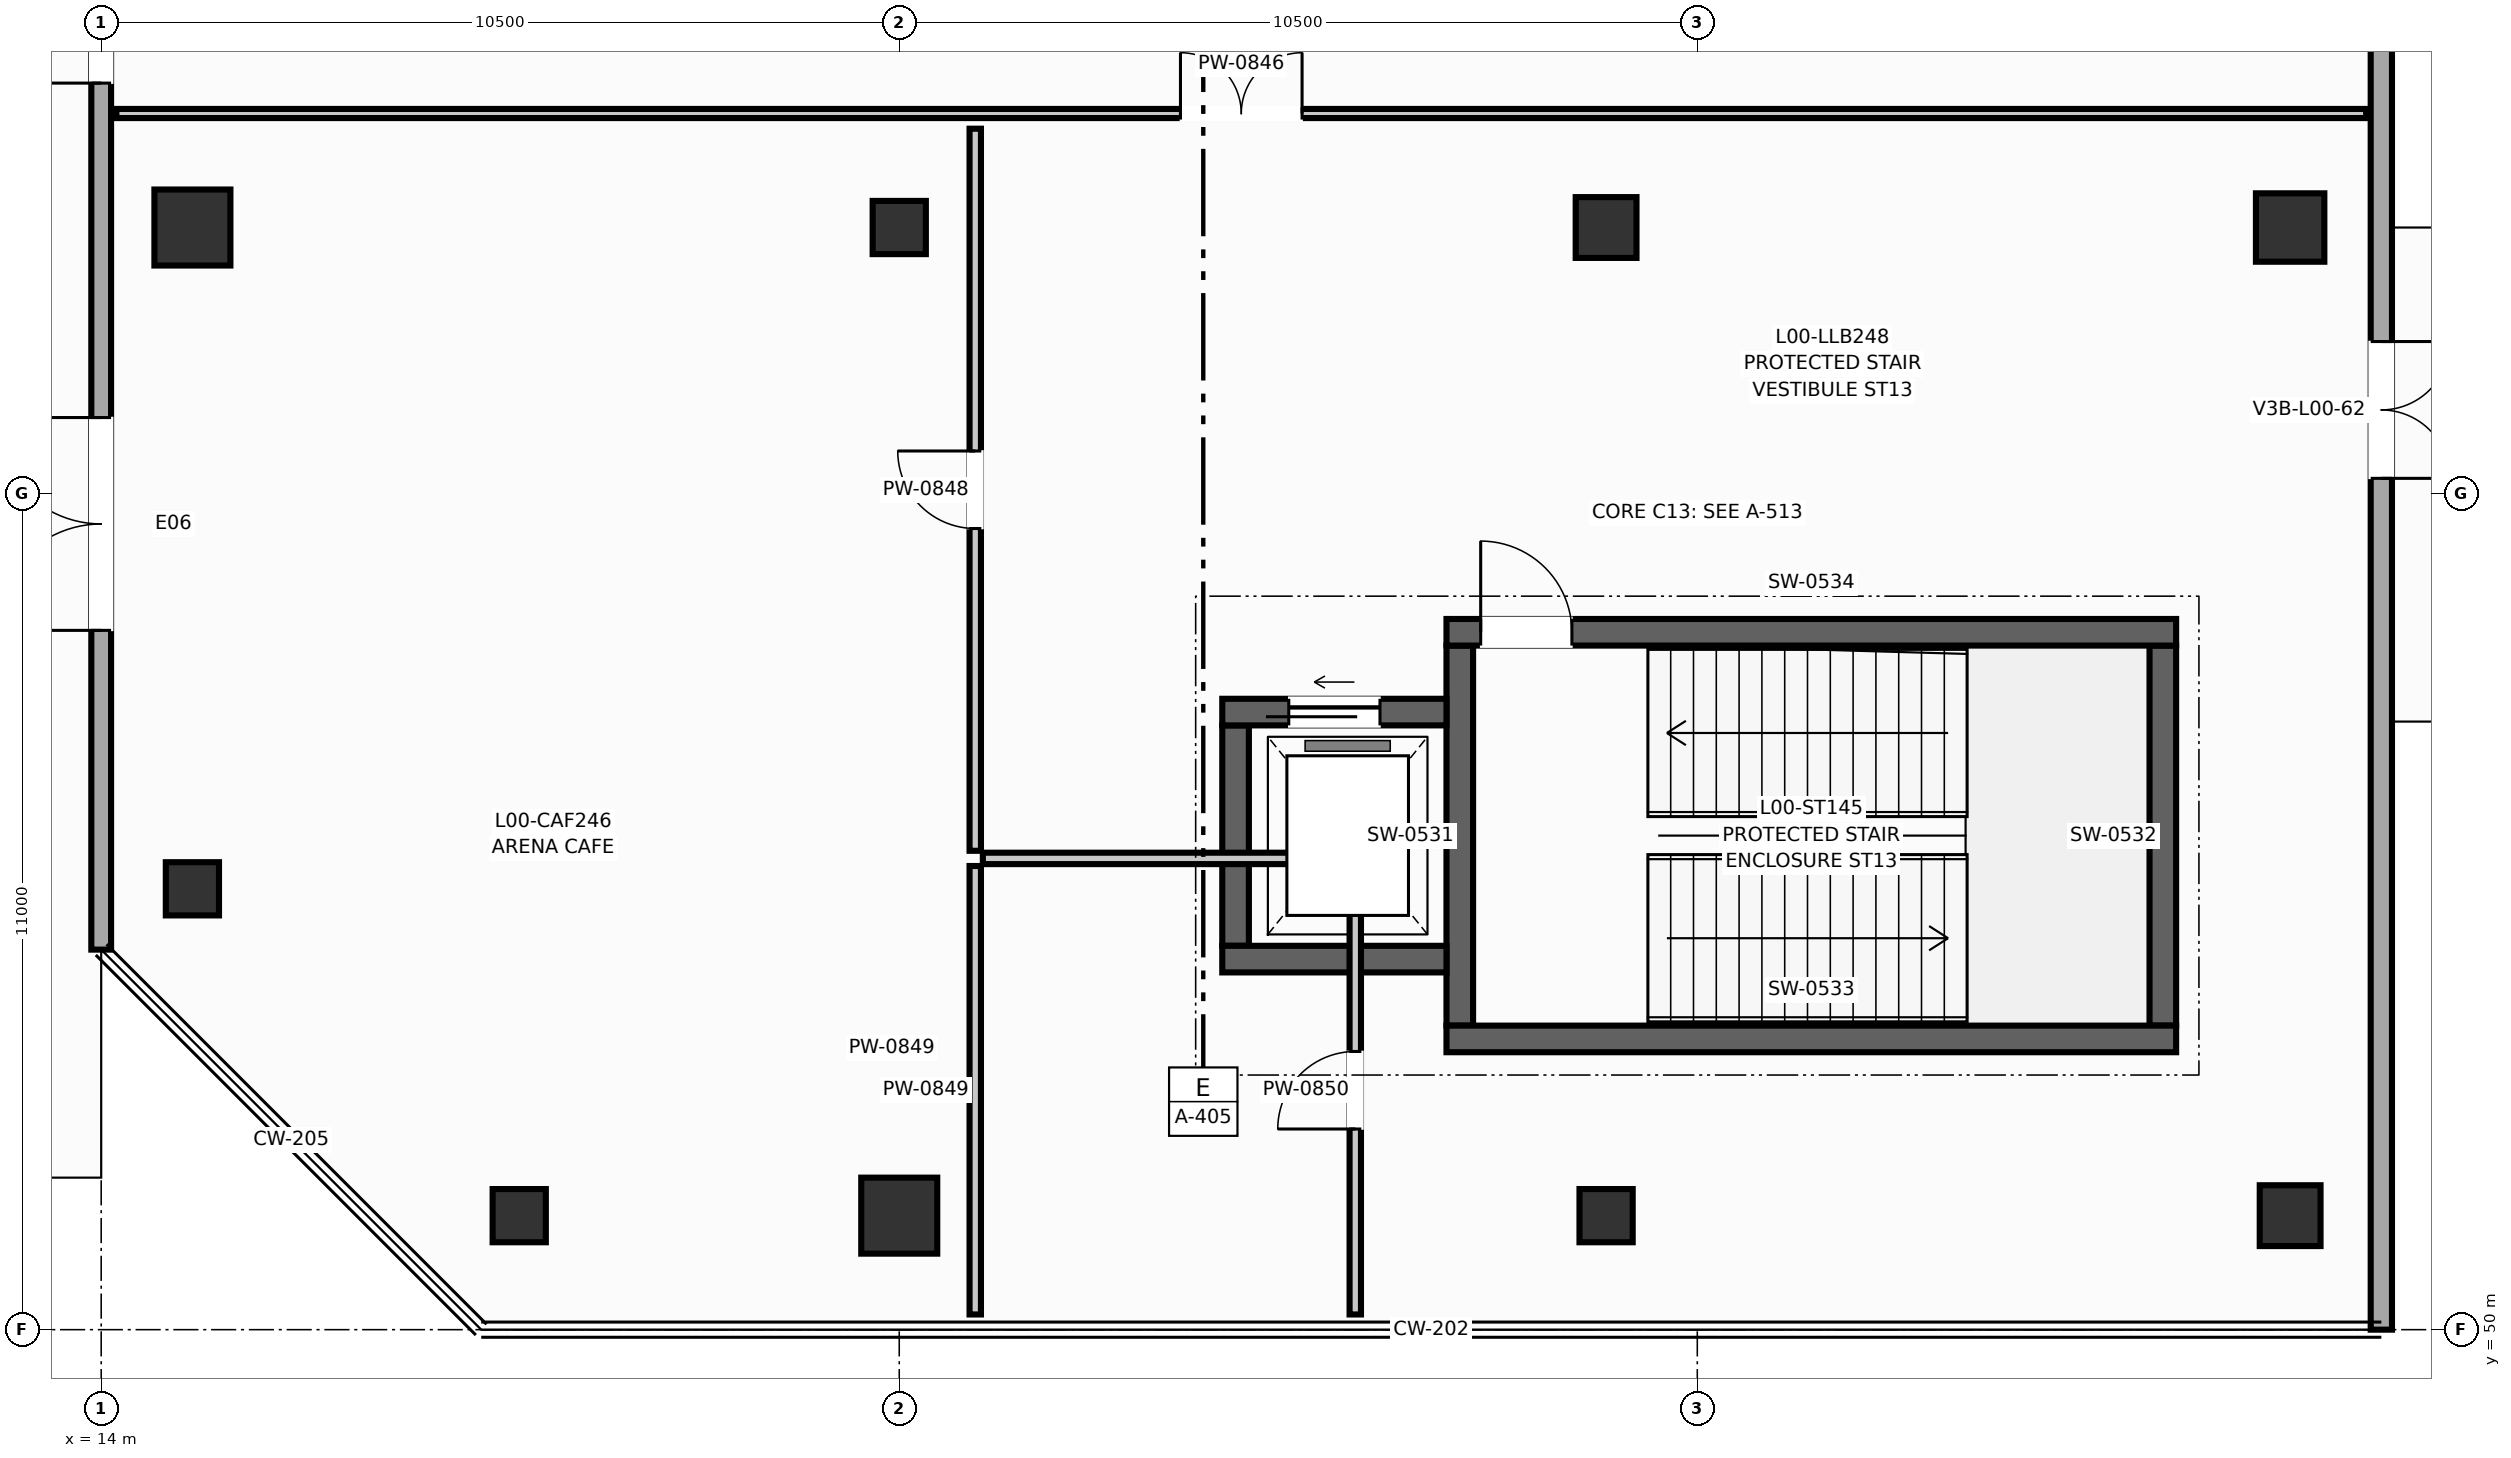
"""IFC4 building model, lengths in metres.
Left out: names, types, materials, properties, quantities, classifications, styles, units other than length and angle.
Written with IfcOpenShell. Run it as: python <this file> out.ifc"""

import sys

from ifc_helpers import new_model, si_unit, direction, frame, frame_2d, origin, origin_2d, place, context, subcontext, project, spatial, rectangle, circle, extrude, element, fill, save


model = new_model("IFC4")
c1 = context("Model", 3, precision=1e-05, world=origin(), true_north=direction((0.0, 1.0)))
c2 = subcontext(c1, "Body", "Model", "MODEL_VIEW")
j1 = project(units=[si_unit("LENGTHUNIT", "METRE"), si_unit("PLANEANGLEUNIT", "RADIAN")], contexts=[c1])
p1 = place(None, origin())
s1 = spatial("IfcSite", under=j1, at=p1, CompositionType="ELEMENT")
p2 = place(p1, origin())
s2 = spatial("IfcBuilding", under=s1, at=p2, CompositionType="ELEMENT")
p3 = place(p2, origin())
s3 = spatial("IfcBuildingStorey", under=s2, at=p3, CompositionType="ELEMENT", Elevation=0.0)
for number, where, z_axis, x_axis in (
    (1, (15.2, 64.5, 0.0), (0.0, 0.0, 1.0), (1.0, 0.0, 0.0)),
    (2, (24.5, 51.5, 0.0), (0.0, 0.0, 1.0), (1.0, 0.0, 0.0)),
):
    element("IfcColumn", number, at=place(p3, frame(where, z_axis=z_axis, x_axis=x_axis)), inside=s3, PredefinedType="COLUMN", context=c2, shape_type="SweptSolid", body=[
        extrude(circle(Radius=0.5, at=origin_2d()), origin(), (0.0, 0.0, 1.0), 4.5),
    ])
for number, where, z_axis, x_axis in (
    (3, (24.5, 64.5, 0.0), (0.0, 0.0, 1.0), (1.0, 0.0, 0.0)),
    (4, (33.8, 51.5, 0.0), (0.0, 0.0, 1.0), (1.0, 0.0, 0.0)),
):
    element("IfcColumn", number, at=place(p3, frame(where, z_axis=z_axis, x_axis=x_axis)), inside=s3, PredefinedType="COLUMN", context=c2, shape_type="SweptSolid", body=[
        extrude(circle(Radius=0.35, at=origin_2d()), origin(), (0.0, 0.0, 1.0), 4.5),
    ])
for number, where, z_axis, x_axis in (
    (5, (33.8, 64.5, 0.0), (0.0, 0.0, 1.0), (1.0, 0.0, 0.0)),
    (6, (42.8, 51.5, 0.0), (0.0, 0.0, 1.0), (1.0, 0.0, 0.0)),
):
    element("IfcColumn", number, at=place(p3, frame(where, z_axis=z_axis, x_axis=x_axis)), inside=s3, PredefinedType="COLUMN", context=c2, shape_type="SweptSolid", body=[
        extrude(circle(Radius=0.4, at=origin_2d()), origin(), (0.0, 0.0, 1.0), 4.5),
    ])
p4 = place(p3, frame((42.8, 64.5, 0.0), z_axis=(0.0, 0.0, 1.0), x_axis=(1.0, 0.0, 0.0)))
e7 = element("IfcColumn", 7, at=p4, inside=s3, PredefinedType="COLUMN", context=c2, shape_type="SweptSolid", body=[
    extrude(circle(Radius=0.45, at=origin_2d()), origin(), (0.0, 0.0, 1.0), 4.5),
])
for number, where, z_axis, x_axis in (
    (8, (19.5, 51.5, 0.0), (0.0, 0.0, 1.0), (1.0, 0.0, 0.0)),
    (9, (15.2, 55.8, 0.0), (0.0, 0.0, 1.0), (1.0, 0.0, 0.0)),
):
    element("IfcColumn", number, at=place(p3, frame(where, z_axis=z_axis, x_axis=x_axis)), inside=s3, PredefinedType="COLUMN", context=c2, shape_type="SweptSolid", body=[
        extrude(circle(Radius=0.35, at=origin_2d()), origin(), (0.0, 0.0, 1.0), 4.5),
    ])
p5 = place(p3, frame((44.0, 50.0, 0.0), z_axis=(0.0, 0.0, 1.0), x_axis=(0.0, 1.0, 0.0)))
e10 = element("IfcWall", 10, at=p5, inside=s3, PredefinedType="SOLIDWALL", context=c2, shape_type="SweptSolid", body=[
    extrude(rectangle(XDim=56.0, YDim=0.28, at=frame_2d((28.0, 0.0))), origin(), (0.0, 0.0, 1.0), 3.55),
])
p6 = place(p5, frame((11.2, 0.0, 0.0)))
e11 = element("IfcOpeningElement", 11, at=p6, cuts=e10, PredefinedType="OPENING", context=c2, shape_type="SweptSolid", body=[
    extrude(rectangle(XDim=1.8, YDim=2.35, at=frame_2d((0.9, 1.175))), frame((0.0, 0.15, 0.0), z_axis=(0.0, -1.0, 0.0), x_axis=(1.0, 0.0, 0.0)), (0.0, 0.0, 1.0), 0.3),
])
p7 = place(p5, frame((43.0, 0.0, 0.0)))
e12 = element("IfcOpeningElement", 12, at=p7, cuts=e10, PredefinedType="OPENING", context=c2, shape_type="SweptSolid", body=[
    extrude(rectangle(XDim=1.8, YDim=2.35, at=frame_2d((0.9, 1.175))), frame((0.0, 0.15, 0.0), z_axis=(0.0, -1.0, 0.0), x_axis=(1.0, 0.0, 0.0)), (0.0, 0.0, 1.0), 0.3),
])
p8 = place(p3, frame((14.0, 101.0, 0.0), z_axis=(0.0, 0.0, 1.0), x_axis=(0.0, -1.0, 0.0)))
e13 = element("IfcWall", 13, at=p8, inside=s3, PredefinedType="SOLIDWALL", context=c2, shape_type="SweptSolid", body=[
    extrude(rectangle(XDim=46.0, YDim=0.26, at=frame_2d((23.0, 0.0))), origin(), (0.0, 0.0, 1.0), 3.55),
])
p9 = place(p8, frame((3.0, 0.0, 0.0)))
e14 = element("IfcOpeningElement", 14, at=p9, cuts=e13, PredefinedType="OPENING", context=c2, shape_type="SweptSolid", body=[
    extrude(rectangle(XDim=2.8, YDim=2.7, at=frame_2d((1.4, 1.35))), frame((0.0, 0.14, 0.0), z_axis=(0.0, -1.0, 0.0), x_axis=(1.0, 0.0, 0.0)), (0.0, 0.0, 1.0), 0.28),
])
p10 = place(p8, frame((10.2, 0.0, 0.0)))
e15 = element("IfcOpeningElement", 15, at=p10, cuts=e13, PredefinedType="OPENING", context=c2, shape_type="SweptSolid", body=[
    extrude(rectangle(XDim=2.8, YDim=2.7, at=frame_2d((1.4, 1.35))), frame((0.0, 0.14, 0.0), z_axis=(0.0, -1.0, 0.0), x_axis=(1.0, 0.0, 0.0)), (0.0, 0.0, 1.0), 0.28),
])
p11 = place(p8, frame((17.4, 0.0, 0.0)))
e16 = element("IfcOpeningElement", 16, at=p11, cuts=e13, PredefinedType="OPENING", context=c2, shape_type="SweptSolid", body=[
    extrude(rectangle(XDim=2.8, YDim=2.7, at=frame_2d((1.4, 1.35))), frame((0.0, 0.14, 0.0), z_axis=(0.0, -1.0, 0.0), x_axis=(1.0, 0.0, 0.0)), (0.0, 0.0, 1.0), 0.28),
])
p12 = place(p8, frame((24.6, 0.0, 0.0)))
e17 = element("IfcOpeningElement", 17, at=p12, cuts=e13, PredefinedType="OPENING", context=c2, shape_type="SweptSolid", body=[
    extrude(rectangle(XDim=2.8, YDim=2.7, at=frame_2d((1.4, 1.35))), frame((0.0, 0.14, 0.0), z_axis=(0.0, -1.0, 0.0), x_axis=(1.0, 0.0, 0.0)), (0.0, 0.0, 1.0), 0.28),
])
p13 = place(p8, frame((31.8, 0.0, 0.0)))
e18 = element("IfcOpeningElement", 18, at=p13, cuts=e13, PredefinedType="OPENING", context=c2, shape_type="SweptSolid", body=[
    extrude(rectangle(XDim=2.8, YDim=2.7, at=frame_2d((1.4, 1.35))), frame((0.0, 0.14, 0.0), z_axis=(0.0, -1.0, 0.0), x_axis=(1.0, 0.0, 0.0)), (0.0, 0.0, 1.0), 0.28),
])
p14 = place(p8, frame((39.0, 0.0, 0.0)))
e19 = element("IfcOpeningElement", 19, at=p14, cuts=e13, PredefinedType="OPENING", context=c2, shape_type="SweptSolid", body=[
    extrude(rectangle(XDim=2.8, YDim=2.7, at=frame_2d((1.4, 1.35))), frame((0.0, 0.14, 0.0), z_axis=(0.0, -1.0, 0.0), x_axis=(1.0, 0.0, 0.0)), (0.0, 0.0, 1.0), 0.28),
])
for number, where, z_axis, x_axis in (
    (20, (31.875, 54.0, 0.0), (0.0, 0.0, 1.0), (0.0, 1.0, 0.0)),
    (21, (41.125, 54.0, 0.0), (0.0, 0.0, 1.0), (0.0, 1.0, 0.0)),
):
    element("IfcWall", number, at=place(p3, frame(where, z_axis=z_axis, x_axis=x_axis)), inside=s3, PredefinedType="SHEAR", context=c2, shape_type="SweptSolid", body=[
        extrude(rectangle(XDim=5.0, YDim=0.35, at=frame_2d((2.5, 0.0))), origin(), (0.0, 0.0, 1.0), 4.29),
    ])
p15 = place(p3, frame((31.7, 53.825, 0.0), z_axis=(0.0, 0.0, 1.0), x_axis=(1.0, 0.0, 0.0)))
e22 = element("IfcWall", 22, at=p15, inside=s3, PredefinedType="SHEAR", context=c2, shape_type="SweptSolid", body=[
    extrude(rectangle(XDim=9.6, YDim=0.35, at=frame_2d((4.8, 0.0))), origin(), (0.0, 0.0, 1.0), 4.29),
])
p16 = place(p3, frame((31.7, 59.175, 0.0), z_axis=(0.0, 0.0, 1.0), x_axis=(1.0, 0.0, 0.0)))
e23 = element("IfcWall", 23, at=p16, inside=s3, PredefinedType="SHEAR", context=c2, shape_type="SweptSolid", body=[
    extrude(rectangle(XDim=9.6, YDim=0.35, at=frame_2d((4.8, 0.0))), origin(), (0.0, 0.0, 1.0), 4.29),
])
p17 = place(p16, frame((0.45, 0.0, 0.0)))
e24 = element("IfcOpeningElement", 24, at=p17, cuts=e23, PredefinedType="OPENING", context=c2, shape_type="SweptSolid", body=[
    extrude(rectangle(XDim=1.2, YDim=2.2, at=frame_2d((0.6, 1.1))), frame((0.0, 0.185, 0.0), z_axis=(0.0, -1.0, 0.0), x_axis=(1.0, 0.0, 0.0)), (0.0, 0.0, 1.0), 0.37),
])
p18 = place(p3, frame((28.925, 55.05, 0.0), z_axis=(0.0, 0.0, 1.0), x_axis=(0.0, 1.0, 0.0)))
e25 = element("IfcWall", 25, at=p18, inside=s3, PredefinedType="SHEAR", context=c2, shape_type="SweptSolid", body=[
    extrude(rectangle(XDim=2.9, YDim=0.35, at=frame_2d((1.45, 0.0))), origin(), (0.0, 0.0, 1.0), 4.29),
])
p19 = place(p3, frame((28.75, 54.875, 0.0), z_axis=(0.0, 0.0, 1.0), x_axis=(1.0, 0.0, 0.0)))
e26 = element("IfcWall", 26, at=p19, inside=s3, PredefinedType="SHEAR", context=c2, shape_type="SweptSolid", body=[
    extrude(rectangle(XDim=2.95, YDim=0.35, at=frame_2d((1.475, 0.0))), origin(), (0.0, 0.0, 1.0), 4.29),
])
p20 = place(p3, frame((28.75, 58.125, 0.0), z_axis=(0.0, 0.0, 1.0), x_axis=(1.0, 0.0, 0.0)))
e27 = element("IfcWall", 27, at=p20, inside=s3, PredefinedType="SHEAR", context=c2, shape_type="SweptSolid", body=[
    extrude(rectangle(XDim=2.95, YDim=0.35, at=frame_2d((1.475, 0.0))), origin(), (0.0, 0.0, 1.0), 4.29),
])
p21 = place(p20, frame((0.875, 0.0, 0.0)))
e28 = element("IfcOpeningElement", 28, at=p21, cuts=e27, PredefinedType="OPENING", context=c2, shape_type="SweptSolid", body=[
    extrude(rectangle(XDim=1.2, YDim=2.2, at=frame_2d((0.6, 1.1))), frame((0.0, 0.185, 0.0), z_axis=(0.0, -1.0, 0.0), x_axis=(1.0, 0.0, 0.0)), (0.0, 0.0, 1.0), 0.37),
])
p22 = place(p3, frame((14.2, 66.0, 0.0), z_axis=(0.0, 0.0, 1.0), x_axis=(1.0, 0.0, 0.0)))
e29 = element("IfcWall", 29, at=p22, inside=s3, PredefinedType="PARTITIONING", context=c2, shape_type="SweptSolid", body=[
    extrude(rectangle(XDim=29.6, YDim=0.12, at=frame_2d((14.8, 0.0))), origin(), (0.0, 0.0, 1.0), 3.22),
])
p23 = place(p22, frame((14.0, 0.0, 0.0)))
e30 = element("IfcOpeningElement", 30, at=p23, cuts=e29, PredefinedType="OPENING", context=c2, shape_type="SweptSolid", body=[
    extrude(rectangle(XDim=1.6, YDim=2.25, at=frame_2d((0.8, 1.125))), frame((0.0, 0.07, 0.0), z_axis=(0.0, -1.0, 0.0), x_axis=(1.0, 0.0, 0.0)), (0.0, 0.0, 1.0), 0.14),
])
p24 = place(p3, frame((25.5, 56.3, 0.0), z_axis=(0.0, 0.0, 1.0), x_axis=(0.0, 1.0, 0.0)))
e31 = element("IfcWall", 31, at=p24, inside=s3, PredefinedType="PARTITIONING", context=c2, shape_type="SweptSolid", body=[
    extrude(rectangle(XDim=9.5, YDim=0.15, at=frame_2d((4.75, 0.0))), origin(), (0.0, 0.0, 1.0), 3.22),
])
p25 = place(p24, frame((4.24, 0.0, 0.0)))
e32 = element("IfcOpeningElement", 32, at=p25, cuts=e31, PredefinedType="OPENING", context=c2, shape_type="SweptSolid", body=[
    extrude(rectangle(XDim=1.02, YDim=2.15, at=frame_2d((0.51, 1.075))), frame((0.0, 0.085, 0.0), z_axis=(0.0, -1.0, 0.0), x_axis=(1.0, 0.0, 0.0)), (0.0, 0.0, 1.0), 0.17),
])
p26 = place(p3, frame((25.5, 50.2, 0.0), z_axis=(0.0, 0.0, 1.0), x_axis=(0.0, 1.0, 0.0)))
e33 = element("IfcWall", 33, at=p26, inside=s3, PredefinedType="PARTITIONING", context=c2, shape_type="SweptSolid", body=[
    extrude(rectangle(XDim=5.9, YDim=0.15, at=frame_2d((2.95, 0.0))), origin(), (0.0, 0.0, 1.0), 3.22),
])
p27 = place(p3, frame((30.5, 50.2, 0.0), z_axis=(0.0, 0.0, 1.0), x_axis=(0.0, 1.0, 0.0)))
e34 = element("IfcWall", 34, at=p27, inside=s3, PredefinedType="PARTITIONING", context=c2, shape_type="SweptSolid", body=[
    extrude(rectangle(XDim=5.9, YDim=0.15, at=frame_2d((2.95, 0.0))), origin(), (0.0, 0.0, 1.0), 3.22),
])
p28 = place(p27, frame((2.44, 0.0, 0.0)))
e35 = element("IfcOpeningElement", 35, at=p28, cuts=e34, PredefinedType="OPENING", context=c2, shape_type="SweptSolid", body=[
    extrude(rectangle(XDim=1.02, YDim=2.15, at=frame_2d((0.51, 1.075))), frame((0.0, 0.085, 0.0), z_axis=(0.0, -1.0, 0.0), x_axis=(1.0, 0.0, 0.0)), (0.0, 0.0, 1.0), 0.17),
])
p29 = place(p3, frame((25.6, 56.2, 0.0), z_axis=(0.0, 0.0, 1.0), x_axis=(1.0, 0.0, 0.0)))
e36 = element("IfcWall", 36, at=p29, inside=s3, PredefinedType="PARTITIONING", context=c2, shape_type="SweptSolid", body=[
    extrude(rectangle(XDim=4.8, YDim=0.15, at=frame_2d((2.4, 0.0))), origin(), (0.0, 0.0, 1.0), 3.22),
])
p30 = place(p6, frame((1.8, 0.0, 0.0), z_axis=(0.0, 0.0, 1.0), x_axis=(-1.0, 0.0, 0.0)))
e37 = element("IfcDoor", 37, at=p30, inside=s3, OperationType="DOUBLE_DOOR_SINGLE_SWING", PredefinedType="DOOR", context=c2, shape_type="SweptSolid", body=[
    extrude(rectangle(XDim=1.8, YDim=2.35, at=frame_2d((0.9, 1.175))), frame((0.0, 0.025, 0.0), z_axis=(0.0, -1.0, 0.0), x_axis=(1.0, 0.0, 0.0)), (0.0, 0.0, 1.0), 0.05),
])
fill(e11, e37)
p31 = place(p13, frame((2.8, 0.0, 0.0), z_axis=(0.0, 0.0, 1.0), x_axis=(-1.0, 0.0, 0.0)))
e38 = element("IfcDoor", 38, at=p31, inside=s3, OperationType="DOUBLE_DOOR_SINGLE_SWING", PredefinedType="DOOR", context=c2, shape_type="SweptSolid", body=[
    extrude(rectangle(XDim=2.8, YDim=2.7, at=frame_2d((1.4, 1.35))), frame((0.0, 0.025, 0.0), z_axis=(0.0, -1.0, 0.0), x_axis=(1.0, 0.0, 0.0)), (0.0, 0.0, 1.0), 0.05),
])
fill(e18, e38)
p32 = place(p14, frame((2.8, 0.0, 0.0), z_axis=(0.0, 0.0, 1.0), x_axis=(-1.0, 0.0, 0.0)))
e39 = element("IfcDoor", 39, at=p32, inside=s3, OperationType="DOUBLE_DOOR_SINGLE_SWING", PredefinedType="DOOR", context=c2, shape_type="SweptSolid", body=[
    extrude(rectangle(XDim=2.8, YDim=2.7, at=frame_2d((1.4, 1.35))), frame((0.0, 0.025, 0.0), z_axis=(0.0, -1.0, 0.0), x_axis=(1.0, 0.0, 0.0)), (0.0, 0.0, 1.0), 0.05),
])
fill(e19, e39)
p33 = place(p17, origin())
e40 = element("IfcDoor", 40, at=p33, inside=s3, OperationType="SINGLE_SWING_LEFT", PredefinedType="DOOR", context=c2, shape_type="SweptSolid", body=[
    extrude(rectangle(XDim=1.2, YDim=2.2, at=frame_2d((0.6, 1.1))), frame((0.0, 0.025, 0.0), z_axis=(0.0, -1.0, 0.0), x_axis=(1.0, 0.0, 0.0)), (0.0, 0.0, 1.0), 0.05),
])
fill(e24, e40)
p34 = place(p21, origin())
e41 = element("IfcDoor", 41, at=p34, inside=s3, OperationType="SLIDING_TO_LEFT", PredefinedType="DOOR", context=c2, shape_type="SweptSolid", body=[
    extrude(rectangle(XDim=1.2, YDim=2.2, at=frame_2d((0.6, 1.1))), frame((0.0, 0.025, 0.0), z_axis=(0.0, -1.0, 0.0), x_axis=(1.0, 0.0, 0.0)), (0.0, 0.0, 1.0), 0.05),
])
fill(e28, e41)
p35 = place(p23, origin())
e42 = element("IfcDoor", 42, at=p35, inside=s3, OperationType="DOUBLE_DOOR_SINGLE_SWING", PredefinedType="DOOR", context=c2, shape_type="SweptSolid", body=[
    extrude(rectangle(XDim=1.6, YDim=2.25, at=frame_2d((0.8, 1.125))), frame((0.0, 0.025, 0.0), z_axis=(0.0, -1.0, 0.0), x_axis=(1.0, 0.0, 0.0)), (0.0, 0.0, 1.0), 0.05),
])
fill(e30, e42)
p36 = place(p25, origin())
e43 = element("IfcDoor", 43, at=p36, inside=s3, OperationType="SINGLE_SWING_RIGHT", PredefinedType="DOOR", context=c2, shape_type="SweptSolid", body=[
    extrude(rectangle(XDim=1.02, YDim=2.15, at=frame_2d((0.51, 1.075))), frame((0.0, 0.025, 0.0), z_axis=(0.0, -1.0, 0.0), x_axis=(1.0, 0.0, 0.0)), (0.0, 0.0, 1.0), 0.05),
])
fill(e32, e43)
p37 = place(p28, origin())
e44 = element("IfcDoor", 44, at=p37, inside=s3, OperationType="SINGLE_SWING_LEFT", PredefinedType="DOOR", context=c2, shape_type="SweptSolid", body=[
    extrude(rectangle(XDim=1.02, YDim=2.15, at=frame_2d((0.51, 1.075))), frame((0.0, 0.025, 0.0), z_axis=(0.0, -1.0, 0.0), x_axis=(1.0, 0.0, 0.0)), (0.0, 0.0, 1.0), 0.05),
])
fill(e35, e44)
save(model, sys.argv[1])
